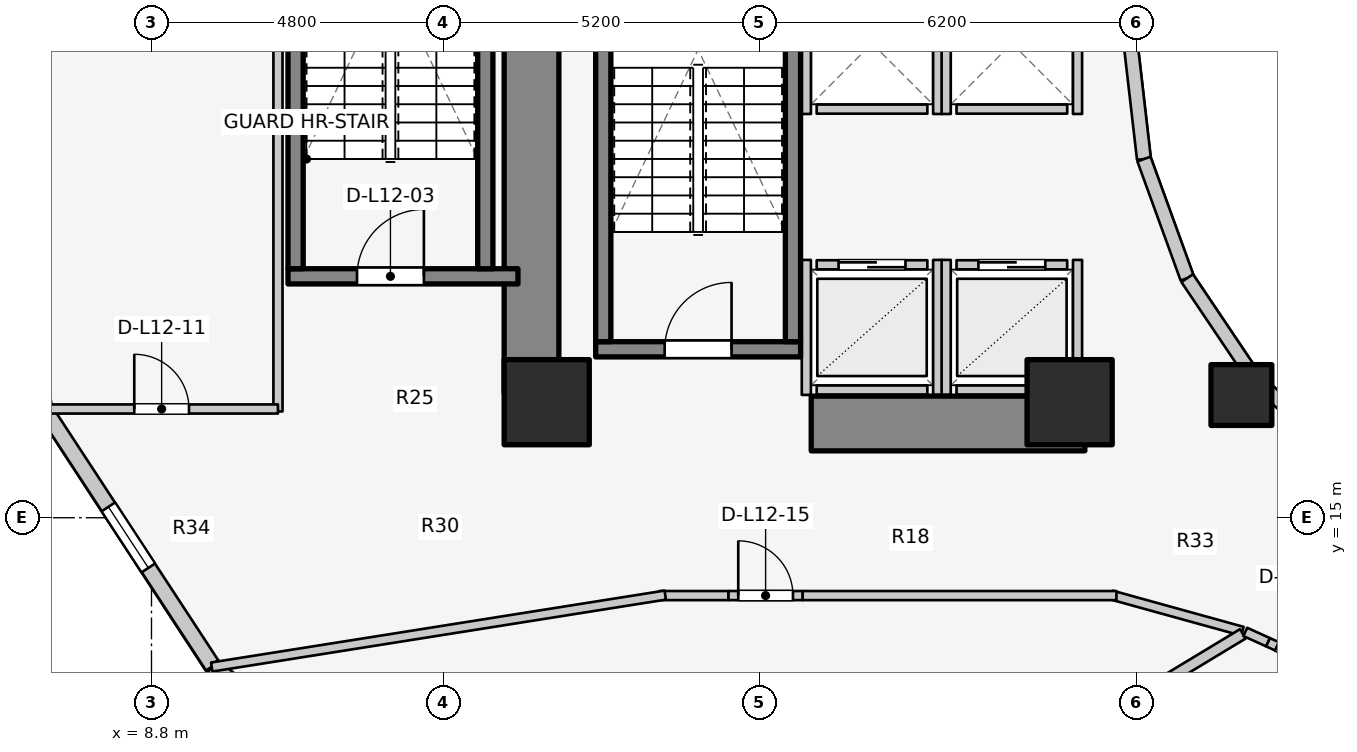
"""IFC4 building model, lengths in metres.
Left out: names, types, materials, properties, quantities, classifications, styles, units other than length and angle.
Written with IfcOpenShell. Run it as: python <this file> out.ifc"""

import sys

from ifc_helpers import new_model, si_unit, direction, frame, frame_2d, origin, origin_2d, place, context, subcontext, project, spatial, rectangle, extrude, element, fill, save


model = new_model("IFC4")
c1 = context("Model", 3, precision=1e-05, world=origin(), true_north=direction((0.0, 1.0)))
c2 = subcontext(c1, "Body", "Model", "MODEL_VIEW")
j1 = project(units=[si_unit("LENGTHUNIT", "METRE"), si_unit("PLANEANGLEUNIT", "RADIAN")], contexts=[c1])
p1 = place(None, origin())
s1 = spatial("IfcSite", under=j1, at=p1, CompositionType="ELEMENT")
p2 = place(p1, origin())
s2 = spatial("IfcBuilding", under=s1, at=p2, CompositionType="ELEMENT")
p3 = place(p2, frame((0.0, 0.0, 43.1)))
s3 = spatial("IfcBuildingStorey", under=s2, at=p3, CompositionType="ELEMENT", Elevation=43.1)
p4 = place(p3, frame((15.05, 17.05, 0.0), z_axis=(0.0, 0.0, 1.0), x_axis=(0.0, 1.0, 0.0)))
e1 = element("IfcWall", 1, at=p4, inside=s3, PredefinedType="SHEAR", context=c2, shape_type="SweptSolid", body=[
    extrude(rectangle(XDim=12.8, YDim=0.9, at=frame_2d((6.4, 0.0))), origin(), (0.0, 0.0, 1.0), 3.1),
])
p5 = place(p3, frame((19.65, 16.55, 0.0), z_axis=(0.0, 0.0, 1.0), x_axis=(1.0, 0.0, 0.0)))
e2 = element("IfcWall", 2, at=p5, inside=s3, PredefinedType="SHEAR", context=c2, shape_type="SweptSolid", body=[
    extrude(rectangle(XDim=4.5, YDim=0.9, at=frame_2d((2.25, 0.0))), origin(), (0.0, 0.0, 1.0), 3.1),
])
p6 = place(p3, frame((16.105, 17.77, 0.0), z_axis=(0.0, 0.0, 1.0), x_axis=(1.0, 0.0, 0.0)))
e3 = element("IfcWall", 3, at=p6, inside=s3, PredefinedType="SOLIDWALL", context=c2, shape_type="SweptSolid", body=[
    extrude(rectangle(XDim=3.37, YDim=0.25, at=frame_2d((1.685, 0.0))), origin(), (0.0, 0.0, 1.0), 3.1),
])
p7 = place(p6, frame((1.135, 0.0, 0.0)))
e4 = element("IfcOpeningElement", 4, at=p7, cuts=e3, PredefinedType="OPENING", context=c2, shape_type="SweptSolid", body=[
    extrude(rectangle(XDim=1.1, YDim=2.1, at=frame_2d((0.55, 1.05))), frame((0.0, 0.135, 0.0), z_axis=(0.0, -1.0, 0.0), x_axis=(1.0, 0.0, 0.0)), (0.0, 0.0, 1.0), 0.27),
])
for number, where, z_axis, x_axis in (
    (5, (16.23, 17.895, 0.0), (0.0, 0.0, 1.0), (0.0, 1.0, 0.0)),
    (6, (19.35, 17.895, 0.0), (0.0, 0.0, 1.0), (0.0, 1.0, 0.0)),
):
    element("IfcWall", number, at=place(p3, frame(where, z_axis=z_axis, x_axis=x_axis)), inside=s3, PredefinedType="SOLIDWALL", context=c2, shape_type="SweptSolid", body=[
        extrude(rectangle(XDim=7.81, YDim=0.25, at=frame_2d((3.905, 0.0))), origin(), (0.0, 0.0, 1.0), 3.1),
    ])
p8 = place(p3, frame((11.045, 18.97, 0.0), z_axis=(0.0, 0.0, 1.0), x_axis=(1.0, 0.0, 0.0)))
e7 = element("IfcWall", 7, at=p8, inside=s3, PredefinedType="SOLIDWALL", context=c2, shape_type="SweptSolid", body=[
    extrude(rectangle(XDim=3.782, YDim=0.25, at=frame_2d((1.891, 0.0))), origin(), (0.0, 0.0, 1.0), 3.1),
])
p9 = place(p8, frame((1.135, 0.0, 0.0)))
e8 = element("IfcOpeningElement", 8, at=p9, cuts=e7, PredefinedType="OPENING", context=c2, shape_type="SweptSolid", body=[
    extrude(rectangle(XDim=1.1, YDim=2.1, at=frame_2d((0.55, 1.05))), frame((0.0, 0.135, 0.0), z_axis=(0.0, -1.0, 0.0), x_axis=(1.0, 0.0, 0.0)), (0.0, 0.0, 1.0), 0.27),
])
for number, where, z_axis, x_axis in (
    (9, (11.17, 19.095, 0.0), (0.0, 0.0, 1.0), (0.0, 1.0, 0.0)),
    (10, (14.29, 19.095, 0.0), (0.0, 0.0, 1.0), (0.0, 1.0, 0.0)),
):
    element("IfcWall", number, at=place(p3, frame(where, z_axis=z_axis, x_axis=x_axis)), inside=s3, PredefinedType="SOLIDWALL", context=c2, shape_type="SweptSolid", body=[
        extrude(rectangle(XDim=7.81, YDim=0.25, at=frame_2d((3.905, 0.0))), origin(), (0.0, 0.0, 1.0), 3.1),
    ])
for number, where, z_axis, x_axis in (
    (11, (15.3, 16.9, 0.0), (0.0, 0.0, 1.0), (1.0, 0.0, 0.0)),
    (12, (23.9, 16.9, 0.0), (0.0, 0.0, 1.0), (1.0, 0.0, 0.0)),
):
    element("IfcColumn", number, at=place(p3, frame(where, z_axis=z_axis, x_axis=x_axis)), inside=s3, PredefinedType="COLUMN", context=c2, shape_type="SweptSolid", body=[
        extrude(rectangle(XDim=1.4, YDim=1.4, at=origin_2d()), origin(), (0.0, 0.0, 1.0), 3.1),
    ])
p10 = place(p3, frame((26.725, 17.018, 0.0), z_axis=(0.0, 0.0, 1.0), x_axis=(1.0, 0.0, 0.0)))
e13 = element("IfcColumn", 13, at=p10, inside=s3, PredefinedType="COLUMN", context=c2, shape_type="SweptSolid", body=[
    extrude(rectangle(XDim=1.0, YDim=1.0, at=origin_2d()), origin(), (0.0, 0.0, 1.0), 3.1),
])
p11 = place(p3, frame((24.88, 23.0, 0.0), z_axis=(0.0, 0.0, 1.0), x_axis=(0.114711713601, -0.993398823617, 0.0)))
e14 = element("IfcWall", 14, at=p11, inside=s3, PredefinedType="STANDARD", context=c2, shape_type="SweptSolid", body=[
    extrude(rectangle(XDim=2.115, YDim=0.23, at=frame_2d((1.058, 0.0))), origin(), (0.0, 0.0, 1.0), 2.56),
])
p12 = place(p3, frame((25.123, 20.898, 0.0), z_axis=(0.0, 0.0, 1.0), x_axis=(0.341423187295, -0.93990968033, 0.0)))
e15 = element("IfcWall", 15, at=p12, inside=s3, PredefinedType="STANDARD", context=c2, shape_type="SweptSolid", body=[
    extrude(rectangle(XDim=2.084, YDim=0.23, at=frame_2d((1.042, 0.0))), origin(), (0.0, 0.0, 1.0), 2.56),
])
p13 = place(p3, frame((25.834, 18.94, 0.0), z_axis=(0.0, 0.0, 1.0), x_axis=(0.558197800898, -0.829707909492, 0.0)))
e16 = element("IfcWall", 16, at=p13, inside=s3, PredefinedType="STANDARD", context=c2, shape_type="SweptSolid", body=[
    extrude(rectangle(XDim=2.027, YDim=0.23, at=frame_2d((1.013, 0.0))), origin(), (0.0, 0.0, 1.0), 1.22),
])
p14 = place(p3, frame((26.965, 17.258, 0.0), z_axis=(0.0, 0.0, 1.0), x_axis=(0.752576694707, -0.658504607869, 0.0)))
e17 = element("IfcWall", 17, at=p14, inside=s3, PredefinedType="STANDARD", context=c2, shape_type="SweptSolid", body=[
    extrude(rectangle(XDim=1.959, YDim=0.23, at=frame_2d((0.98, 0.0))), origin(), (0.0, 0.0, 1.0), 1.22),
])
p15 = place(p3, frame((7.033, 16.795, 0.0), z_axis=(0.0, 0.0, 1.0), x_axis=(0.547702757047, -0.836672988642, 0.0)))
e18 = element("IfcWall", 18, at=p15, inside=s3, PredefinedType="STANDARD", context=c2, shape_type="SweptSolid", body=[
    extrude(rectangle(XDim=5.062, YDim=0.26, at=frame_2d((2.531, 0.0))), origin(), (0.0, 0.0, 1.0), 1.22),
])
p16 = place(p15, frame((1.931, 0.0, 0.15)))
e19 = element("IfcOpeningElement", 19, at=p16, cuts=e18, PredefinedType="OPENING", context=c2, shape_type="SweptSolid", body=[
    extrude(rectangle(XDim=1.2, YDim=0.9, at=frame_2d((0.6, 0.45))), frame((0.0, 0.14, 0.0), z_axis=(0.0, -1.0, 0.0), x_axis=(1.0, 0.0, 0.0)), (0.0, 0.0, 1.0), 0.28),
])
p17 = place(p3, frame((9.806, 12.559, 0.0), z_axis=(0.0, 0.0, 1.0), x_axis=(0.783123133379, -0.621866672179, 0.0)))
e20 = element("IfcWall", 20, at=p17, inside=s3, PredefinedType="STANDARD", context=c2, shape_type="SweptSolid", body=[
    extrude(rectangle(XDim=4.839, YDim=0.26, at=frame_2d((2.419, 0.0))), origin(), (0.0, 0.0, 1.0), 1.22),
])
p18 = place(p17, frame((1.819, 0.0, 0.15)))
e21 = element("IfcOpeningElement", 21, at=p18, cuts=e20, PredefinedType="OPENING", context=c2, shape_type="SweptSolid", body=[
    extrude(rectangle(XDim=1.2, YDim=0.9, at=frame_2d((0.6, 0.45))), frame((0.0, 0.14, 0.0), z_axis=(0.0, -1.0, 0.0), x_axis=(1.0, 0.0, 0.0)), (0.0, 0.0, 1.0), 0.28),
])
p19 = place(p3, frame((19.74, 19.16, 0.0), z_axis=(0.0, 0.0, 1.0), x_axis=(1.0, 0.0, 0.0)))
e22 = element("IfcWall", 22, at=p19, inside=s3, PredefinedType="SOLIDWALL", context=c2, shape_type="SweptSolid", body=[
    extrude(rectangle(XDim=1.82, YDim=0.15, at=frame_2d((0.91, 0.0))), origin(), (0.0, 0.0, 1.0), 2.575),
])
p20 = place(p19, frame((0.36, 0.0, 0.0)))
e23 = element("IfcOpeningElement", 23, at=p20, cuts=e22, PredefinedType="OPENING", context=c2, shape_type="SweptSolid", body=[
    extrude(rectangle(XDim=1.1, YDim=2.1, at=frame_2d((0.55, 1.05))), frame((0.0, 0.085, 0.0), z_axis=(0.0, -1.0, 0.0), x_axis=(1.0, 0.0, 0.0)), (0.0, 0.0, 1.0), 0.17),
])
p21 = place(p3, frame((19.74, 17.1, 0.0), z_axis=(0.0, 0.0, 1.0), x_axis=(1.0, 0.0, 0.0)))
e24 = element("IfcWall", 24, at=p21, inside=s3, PredefinedType="SOLIDWALL", context=c2, shape_type="SweptSolid", body=[
    extrude(rectangle(XDim=1.82, YDim=0.15, at=frame_2d((0.91, 0.0))), origin(), (0.0, 0.0, 1.0), 2.575),
])
p22 = place(p3, frame((19.57, 17.02, 0.0), z_axis=(0.0, 0.0, 1.0), x_axis=(0.0, 1.0, 0.0)))
e25 = element("IfcWall", 25, at=p22, inside=s3, PredefinedType="SOLIDWALL", context=c2, shape_type="SweptSolid", body=[
    extrude(rectangle(XDim=2.22, YDim=0.15, at=frame_2d((1.11, 0.0))), origin(), (0.0, 0.0, 1.0), 2.12),
])
p23 = place(p3, frame((21.73, 17.02, 0.0), z_axis=(0.0, 0.0, 1.0), x_axis=(0.0, 1.0, 0.0)))
e26 = element("IfcWall", 26, at=p23, inside=s3, PredefinedType="SOLIDWALL", context=c2, shape_type="SweptSolid", body=[
    extrude(rectangle(XDim=2.22, YDim=0.15, at=frame_2d((1.11, 0.0))), origin(), (0.0, 0.0, 1.0), 2.575),
])
p24 = place(p3, frame((22.04, 19.16, 0.0), z_axis=(0.0, 0.0, 1.0), x_axis=(1.0, 0.0, 0.0)))
e27 = element("IfcWall", 27, at=p24, inside=s3, PredefinedType="SOLIDWALL", context=c2, shape_type="SweptSolid", body=[
    extrude(rectangle(XDim=1.82, YDim=0.15, at=frame_2d((0.91, 0.0))), origin(), (0.0, 0.0, 1.0), 2.12),
])
p25 = place(p24, frame((0.36, 0.0, 0.0)))
e28 = element("IfcOpeningElement", 28, at=p25, cuts=e27, PredefinedType="OPENING", context=c2, shape_type="SweptSolid", body=[
    extrude(rectangle(XDim=1.1, YDim=2.1, at=frame_2d((0.55, 1.05))), frame((0.0, 0.085, 0.0), z_axis=(0.0, -1.0, 0.0), x_axis=(1.0, 0.0, 0.0)), (0.0, 0.0, 1.0), 0.17),
])
p26 = place(p3, frame((22.04, 17.1, 0.0), z_axis=(0.0, 0.0, 1.0), x_axis=(1.0, 0.0, 0.0)))
e29 = element("IfcWall", 29, at=p26, inside=s3, PredefinedType="SOLIDWALL", context=c2, shape_type="SweptSolid", body=[
    extrude(rectangle(XDim=1.82, YDim=0.15, at=frame_2d((0.91, 0.0))), origin(), (0.0, 0.0, 1.0), 2.12),
])
p27 = place(p3, frame((21.87, 17.02, 0.0), z_axis=(0.0, 0.0, 1.0), x_axis=(0.0, 1.0, 0.0)))
e30 = element("IfcWall", 30, at=p27, inside=s3, PredefinedType="SOLIDWALL", context=c2, shape_type="SweptSolid", body=[
    extrude(rectangle(XDim=2.22, YDim=0.15, at=frame_2d((1.11, 0.0))), origin(), (0.0, 0.0, 1.0), 2.575),
])
p28 = place(p3, frame((24.03, 17.02, 0.0), z_axis=(0.0, 0.0, 1.0), x_axis=(0.0, 1.0, 0.0)))
e31 = element("IfcWall", 31, at=p28, inside=s3, PredefinedType="SOLIDWALL", context=c2, shape_type="SweptSolid", body=[
    extrude(rectangle(XDim=2.22, YDim=0.15, at=frame_2d((1.11, 0.0))), origin(), (0.0, 0.0, 1.0), 1.873),
])
p29 = place(p3, frame((19.74, 21.72, 0.0), z_axis=(0.0, 0.0, 1.0), x_axis=(1.0, 0.0, 0.0)))
e32 = element("IfcWall", 32, at=p29, inside=s3, PredefinedType="SOLIDWALL", context=c2, shape_type="SweptSolid", body=[
    extrude(rectangle(XDim=1.82, YDim=0.15, at=frame_2d((0.91, 0.0))), origin(), (0.0, 0.0, 1.0), 2.575),
])
for number, where, z_axis, x_axis in (
    (33, (19.57, 21.64, 0.0), (0.0, 0.0, 1.0), (0.0, 1.0, 0.0)),
    (34, (21.73, 21.64, 0.0), (0.0, 0.0, 1.0), (0.0, 1.0, 0.0)),
):
    element("IfcWall", number, at=place(p3, frame(where, z_axis=z_axis, x_axis=x_axis)), inside=s3, PredefinedType="SOLIDWALL", context=c2, shape_type="SweptSolid", body=[
        extrude(rectangle(XDim=2.32, YDim=0.15, at=frame_2d((1.16, 0.0))), origin(), (0.0, 0.0, 1.0), 2.575),
    ])
p30 = place(p3, frame((22.04, 21.72, 0.0), z_axis=(0.0, 0.0, 1.0), x_axis=(1.0, 0.0, 0.0)))
e35 = element("IfcWall", 35, at=p30, inside=s3, PredefinedType="SOLIDWALL", context=c2, shape_type="SweptSolid", body=[
    extrude(rectangle(XDim=1.82, YDim=0.15, at=frame_2d((0.91, 0.0))), origin(), (0.0, 0.0, 1.0), 2.12),
])
p31 = place(p3, frame((21.87, 21.64, 0.0), z_axis=(0.0, 0.0, 1.0), x_axis=(0.0, 1.0, 0.0)))
e36 = element("IfcWall", 36, at=p31, inside=s3, PredefinedType="SOLIDWALL", context=c2, shape_type="SweptSolid", body=[
    extrude(rectangle(XDim=2.32, YDim=0.15, at=frame_2d((1.16, 0.0))), origin(), (0.0, 0.0, 1.0), 2.575),
])
p32 = place(p3, frame((24.03, 21.64, 0.0), z_axis=(0.0, 0.0, 1.0), x_axis=(0.0, 1.0, 0.0)))
e37 = element("IfcWall", 37, at=p32, inside=s3, PredefinedType="SOLIDWALL", context=c2, shape_type="SweptSolid", body=[
    extrude(rectangle(XDim=2.32, YDim=0.15, at=frame_2d((1.16, 0.0))), origin(), (0.0, 0.0, 1.0), 2.12),
])
p33 = place(p3, frame((10.88, 16.748, 0.0), z_axis=(0.0, 0.0, 1.0), x_axis=(0.0, 1.0, 0.0)))
e38 = element("IfcWall", 38, at=p33, inside=s3, PredefinedType="PARTITIONING", context=c2, shape_type="SweptSolid", body=[
    extrude(rectangle(XDim=12.503, YDim=0.15, at=frame_2d((6.252, 0.0))), origin(), (0.0, 0.0, 1.0), 2.12),
])
p34 = place(p3, frame((7.014, 16.788, 0.0), z_axis=(0.0, 0.0, 1.0), x_axis=(1.0, 0.0, 0.0)))
e39 = element("IfcWall", 39, at=p34, inside=s3, PredefinedType="PARTITIONING", context=c2, shape_type="SweptSolid", body=[
    extrude(rectangle(XDim=3.866, YDim=0.15, at=frame_2d((1.933, 0.0))), origin(), (0.0, 0.0, 1.0), 2.575),
])
p35 = place(p34, frame((1.503, 0.0, 0.0)))
e40 = element("IfcOpeningElement", 40, at=p35, cuts=e39, PredefinedType="OPENING", context=c2, shape_type="SweptSolid", body=[
    extrude(rectangle(XDim=0.9, YDim=2.1, at=frame_2d((0.45, 1.05))), frame((0.0, 0.085, 0.0), z_axis=(0.0, -1.0, 0.0), x_axis=(1.0, 0.0, 0.0)), (0.0, 0.0, 1.0), 0.17),
])
p36 = place(p3, frame((26.742, 13.133, 0.0), z_axis=(0.0, 0.0, 1.0), x_axis=(-0.963833843713, 0.266503886865, 0.0)))
e41 = element("IfcWall", 41, at=p36, inside=s3, PredefinedType="PARTITIONING", context=c2, shape_type="SweptSolid", body=[
    extrude(rectangle(XDim=2.232, YDim=0.15, at=frame_2d((1.116, 0.0))), origin(), (0.0, 0.0, 1.0), 1.957),
])
p37 = place(p3, frame((17.15, 13.72, 0.0), z_axis=(0.0, 0.0, 1.0), x_axis=(1.0, 0.0, 0.0)))
e42 = element("IfcWall", 42, at=p37, inside=s3, PredefinedType="PARTITIONING", context=c2, shape_type="SweptSolid", body=[
    extrude(rectangle(XDim=1.14, YDim=0.15, at=frame_2d((0.57, 0.0))), origin(), (0.0, 0.0, 1.0), 2.575),
])
p38 = place(p3, frame((18.29, 13.72, 0.0), z_axis=(0.0, 0.0, 1.0), x_axis=(1.0, 0.0, 0.0)))
e43 = element("IfcWall", 43, at=p38, inside=s3, PredefinedType="PARTITIONING", context=c2, shape_type="SweptSolid", body=[
    extrude(rectangle(XDim=1.22, YDim=0.15, at=frame_2d((0.61, 0.0))), origin(), (0.0, 0.0, 1.0), 2.575),
])
p39 = place(p38, frame((0.16, 0.0, 0.0)))
e44 = element("IfcOpeningElement", 44, at=p39, cuts=e43, PredefinedType="OPENING", context=c2, shape_type="SweptSolid", body=[
    extrude(rectangle(XDim=0.9, YDim=2.1, at=frame_2d((0.45, 1.05))), frame((0.0, 0.085, 0.0), z_axis=(0.0, -1.0, 0.0), x_axis=(1.0, 0.0, 0.0)), (0.0, 0.0, 1.0), 0.17),
])
p40 = place(p3, frame((19.51, 13.72, 0.0), z_axis=(0.0, 0.0, 1.0), x_axis=(1.0, 0.0, 0.0)))
e45 = element("IfcWall", 45, at=p40, inside=s3, PredefinedType="PARTITIONING", context=c2, shape_type="SweptSolid", body=[
    extrude(rectangle(XDim=5.16, YDim=0.15, at=frame_2d((2.58, 0.0))), origin(), (0.0, 0.0, 1.0), 1.957),
])
p41 = place(p3, frame((17.25, 13.728, 0.0), z_axis=(0.0, 0.0, 1.0), x_axis=(-0.987655781226, -0.156639898525, 0.0)))
e46 = element("IfcWall", 46, at=p41, inside=s3, PredefinedType="PARTITIONING", context=c2, shape_type="SweptSolid", body=[
    extrude(rectangle(XDim=7.552, YDim=0.15, at=frame_2d((3.776, 0.0))), origin(), (0.0, 0.0, 1.0), 1.22),
])
p42 = place(p3, frame((26.748, 13.09, 0.0), z_axis=(0.0, 0.0, 1.0), x_axis=(-0.855817136021, -0.517278483694, 0.0)))
e47 = element("IfcWall", 47, at=p42, inside=s3, PredefinedType="PARTITIONING", context=c2, shape_type="SweptSolid", body=[
    extrude(rectangle(XDim=9.564, YDim=0.18, at=frame_2d((4.782, 0.0))), origin(), (0.0, 0.0, 1.0), 1.957),
])
p43 = place(p3, frame((26.789, 13.123, 0.0), z_axis=(0.0, 0.0, 1.0), x_axis=(0.910630236002, -0.413222183915, 0.0)))
e48 = element("IfcWall", 48, at=p43, inside=s3, PredefinedType="PARTITIONING", context=c2, shape_type="SweptSolid", body=[
    extrude(rectangle(XDim=0.412, YDim=0.15, at=frame_2d((0.206, 0.0))), origin(), (0.0, 0.0, 1.0), 2.575),
])
p44 = place(p3, frame((27.164, 12.952, 0.0), z_axis=(0.0, 0.0, 1.0), x_axis=(0.910524396382, -0.413455346552, 0.0)))
e49 = element("IfcWall", 49, at=p44, inside=s3, PredefinedType="PARTITIONING", context=c2, shape_type="SweptSolid", body=[
    extrude(rectangle(XDim=1.27, YDim=0.15, at=frame_2d((0.635, 0.0))), origin(), (0.0, 0.0, 1.0), 2.16),
])
p45 = place(p44, frame((0.16, 0.0, 0.0)))
e50 = element("IfcOpeningElement", 50, at=p45, cuts=e49, PredefinedType="OPENING", context=c2, shape_type="SweptSolid", body=[
    extrude(rectangle(XDim=0.95, YDim=2.1, at=frame_2d((0.475, 1.05))), frame((0.0, 0.085, 0.0), z_axis=(0.0, -1.0, 0.0), x_axis=(1.0, 0.0, 0.0)), (0.0, 0.0, 1.0), 0.17),
])
p46 = place(p16, origin())
e51 = element("IfcWindow", 51, at=p46, inside=s3, PartitioningType="SINGLE_PANEL", PredefinedType="WINDOW", context=c2, shape_type="SweptSolid", body=[
    extrude(rectangle(XDim=1.2, YDim=0.9, at=frame_2d((0.6, 0.45))), frame((0.0, 0.03, 0.0), z_axis=(0.0, -1.0, 0.0), x_axis=(1.0, 0.0, 0.0)), (0.0, 0.0, 1.0), 0.06),
])
fill(e19, e51)
p47 = place(p7, origin())
e52 = element("IfcDoor", 52, at=p47, inside=s3, OperationType="SINGLE_SWING_RIGHT", PredefinedType="DOOR", context=c2, shape_type="SweptSolid", body=[
    extrude(rectangle(XDim=1.1, YDim=2.1, at=frame_2d((0.55, 1.05))), frame((0.0, 0.025, 0.0), z_axis=(0.0, -1.0, 0.0), x_axis=(1.0, 0.0, 0.0)), (0.0, 0.0, 1.0), 0.05),
])
fill(e4, e52)
p48 = place(p9, origin())
e53 = element("IfcDoor", 53, at=p48, inside=s3, OperationType="SINGLE_SWING_RIGHT", PredefinedType="DOOR", context=c2, shape_type="SweptSolid", body=[
    extrude(rectangle(XDim=1.1, YDim=2.1, at=frame_2d((0.55, 1.05))), frame((0.0, 0.025, 0.0), z_axis=(0.0, -1.0, 0.0), x_axis=(1.0, 0.0, 0.0)), (0.0, 0.0, 1.0), 0.05),
])
fill(e8, e53)
p49 = place(p20, origin())
e54 = element("IfcDoor", 54, at=p49, inside=s3, OperationType="DOUBLE_DOOR_SLIDING", PredefinedType="DOOR", context=c2, shape_type="SweptSolid", body=[
    extrude(rectangle(XDim=1.1, YDim=2.1, at=frame_2d((0.55, 1.05))), frame((0.0, 0.025, 0.0), z_axis=(0.0, -1.0, 0.0), x_axis=(1.0, 0.0, 0.0)), (0.0, 0.0, 1.0), 0.05),
])
fill(e23, e54)
p50 = place(p25, origin())
e55 = element("IfcDoor", 55, at=p50, inside=s3, OperationType="DOUBLE_DOOR_SLIDING", PredefinedType="DOOR", context=c2, shape_type="SweptSolid", body=[
    extrude(rectangle(XDim=1.1, YDim=2.1, at=frame_2d((0.55, 1.05))), frame((0.0, 0.025, 0.0), z_axis=(0.0, -1.0, 0.0), x_axis=(1.0, 0.0, 0.0)), (0.0, 0.0, 1.0), 0.05),
])
fill(e28, e55)
p51 = place(p35, origin())
e56 = element("IfcDoor", 56, at=p51, inside=s3, OperationType="SINGLE_SWING_LEFT", PredefinedType="DOOR", context=c2, shape_type="SweptSolid", body=[
    extrude(rectangle(XDim=0.9, YDim=2.1, at=frame_2d((0.45, 1.05))), frame((0.0, 0.025, 0.0), z_axis=(0.0, -1.0, 0.0), x_axis=(1.0, 0.0, 0.0)), (0.0, 0.0, 1.0), 0.05),
])
fill(e40, e56)
p52 = place(p39, origin())
e57 = element("IfcDoor", 57, at=p52, inside=s3, OperationType="SINGLE_SWING_LEFT", PredefinedType="DOOR", context=c2, shape_type="SweptSolid", body=[
    extrude(rectangle(XDim=0.9, YDim=2.1, at=frame_2d((0.45, 1.05))), frame((0.0, 0.025, 0.0), z_axis=(0.0, -1.0, 0.0), x_axis=(1.0, 0.0, 0.0)), (0.0, 0.0, 1.0), 0.05),
])
fill(e44, e57)
p53 = place(p45, origin())
e58 = element("IfcDoor", 58, at=p53, inside=s3, OperationType="SINGLE_SWING_RIGHT", PredefinedType="DOOR", context=c2, shape_type="SweptSolid", body=[
    extrude(rectangle(XDim=0.95, YDim=2.1, at=frame_2d((0.475, 1.05))), frame((0.0, 0.025, 0.0), z_axis=(0.0, -1.0, 0.0), x_axis=(1.0, 0.0, 0.0)), (0.0, 0.0, 1.0), 0.05),
])
fill(e50, e58)
save(model, sys.argv[1])
